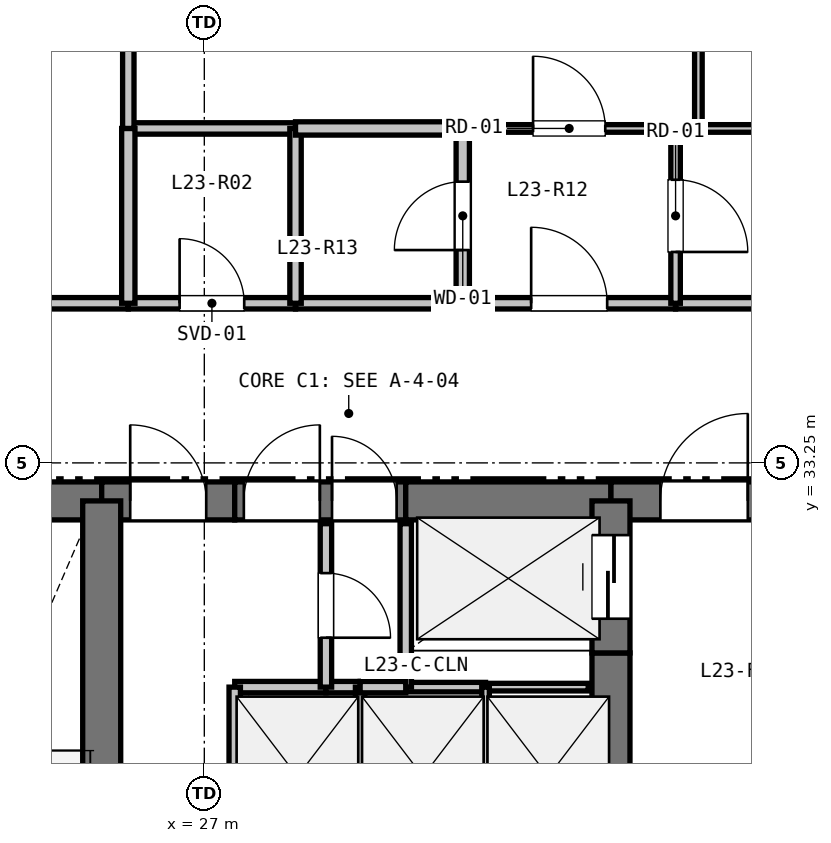
"""IFC4 building model, lengths in metres.
Left out: names, types, materials, properties, quantities, classifications, styles, units other than length and angle.
Written with IfcOpenShell. Run it as: python <this file> out.ifc"""

import sys

from ifc_helpers import new_model, si_unit, direction, frame, frame_2d, origin, place, context, subcontext, project, spatial, rectangle, extrude, element, fill, save


model = new_model("IFC4")
c1 = context("Model", 3, precision=1e-05, world=origin(), true_north=direction((0.0, 1.0)))
c2 = subcontext(c1, "Body", "Model", "MODEL_VIEW")
j1 = project(units=[si_unit("LENGTHUNIT", "METRE"), si_unit("PLANEANGLEUNIT", "RADIAN")], contexts=[c1])
p1 = place(None, origin())
s1 = spatial("IfcSite", under=j1, at=p1, CompositionType="ELEMENT")
p2 = place(p1, origin())
s2 = spatial("IfcBuilding", under=s1, at=p2, CompositionType="ELEMENT")
p3 = place(p2, frame((0.0, 0.0, 86.7)))
s3 = spatial("IfcBuildingStorey", under=s2, at=p3, CompositionType="ELEMENT", Elevation=86.7)
p4 = place(p3, frame((17.12, 36.097, 0.0), z_axis=(0.0, 0.0, 1.0), x_axis=(0.866027010039, 0.499997217876, 0.0)))
e1 = element("IfcWall", 1, at=p4, inside=s3, PredefinedType="PARAPET", context=c2, shape_type="SweptSolid", body=[
    extrude(rectangle(XDim=11.229, YDim=0.2, at=frame_2d((5.615, 0.0))), origin(), (0.0, 0.0, 1.0), 0.2),
])
p5 = place(p3, frame((22.2, 32.75, 0.0), z_axis=(0.0, 0.0, 1.0), x_axis=(1.0, 0.0, 0.0)))
e2 = element("IfcWall", 2, at=p5, inside=s3, PredefinedType="SHEAR", context=c2, shape_type="SweptSolid", body=[
    extrude(rectangle(XDim=3.45, YDim=0.5, at=frame_2d((1.725, 0.0))), origin(), (0.0, 0.0, 1.0), 3.05),
])
p6 = place(p3, frame((25.65, 32.75, 0.0), z_axis=(0.0, 0.0, 1.0), x_axis=(1.0, 0.0, 0.0)))
e3 = element("IfcWall", 3, at=p6, inside=s3, PredefinedType="SHEAR", context=c2, shape_type="SweptSolid", body=[
    extrude(rectangle(XDim=1.75, YDim=0.5, at=frame_2d((0.875, 0.0))), origin(), (0.0, 0.0, 1.0), 3.05),
])
p7 = place(p6, frame((0.375, 0.0, 0.0)))
e4 = element("IfcOpeningElement", 4, at=p7, cuts=e3, PredefinedType="OPENING", context=c2, shape_type="SweptSolid", body=[
    extrude(rectangle(XDim=1.0, YDim=2.15, at=frame_2d((0.5, 1.075))), frame((0.0, 0.26, 0.0), z_axis=(0.0, -1.0, 0.0), x_axis=(1.0, 0.0, 0.0)), (0.0, 0.0, 1.0), 0.52),
])
p8 = place(p3, frame((27.4, 32.75, 0.0), z_axis=(0.0, 0.0, 1.0), x_axis=(1.0, 0.0, 0.0)))
e5 = element("IfcWall", 5, at=p8, inside=s3, PredefinedType="SHEAR", context=c2, shape_type="SweptSolid", body=[
    extrude(rectangle(XDim=2.25, YDim=0.5, at=frame_2d((1.125, 0.0))), origin(), (0.0, 0.0, 1.0), 3.05),
])
p9 = place(p8, frame((0.12, 0.0, 0.0)))
e6 = element("IfcOpeningElement", 6, at=p9, cuts=e5, PredefinedType="OPENING", context=c2, shape_type="SweptSolid", body=[
    extrude(rectangle(XDim=1.0, YDim=2.15, at=frame_2d((0.5, 1.075))), frame((0.0, 0.26, 0.0), z_axis=(0.0, -1.0, 0.0), x_axis=(1.0, 0.0, 0.0)), (0.0, 0.0, 1.0), 0.52),
])
p10 = place(p8, frame((1.28, 0.0, 0.0)))
e7 = element("IfcOpeningElement", 7, at=p10, cuts=e5, PredefinedType="OPENING", context=c2, shape_type="SweptSolid", body=[
    extrude(rectangle(XDim=0.85, YDim=2.1, at=frame_2d((0.425, 1.05))), frame((0.0, 0.26, 0.0), z_axis=(0.0, -1.0, 0.0), x_axis=(1.0, 0.0, 0.0)), (0.0, 0.0, 1.0), 0.52),
])
p11 = place(p3, frame((29.65, 32.75, 0.0), z_axis=(0.0, 0.0, 1.0), x_axis=(1.0, 0.0, 0.0)))
e8 = element("IfcWall", 8, at=p11, inside=s3, PredefinedType="SHEAR", context=c2, shape_type="SweptSolid", body=[
    extrude(rectangle(XDim=2.7, YDim=0.5, at=frame_2d((1.35, 0.0))), origin(), (0.0, 0.0, 1.0), 3.05),
])
p12 = place(p3, frame((32.35, 32.75, 0.0), z_axis=(0.0, 0.0, 1.0), x_axis=(1.0, 0.0, 0.0)))
e9 = element("IfcWall", 9, at=p12, inside=s3, PredefinedType="SHEAR", context=c2, shape_type="SweptSolid", body=[
    extrude(rectangle(XDim=3.45, YDim=0.5, at=frame_2d((1.725, 0.0))), origin(), (0.0, 0.0, 1.0), 3.05),
])
p13 = place(p12, frame((0.65, 0.0, 0.0)))
e10 = element("IfcOpeningElement", 10, at=p13, cuts=e9, PredefinedType="OPENING", context=c2, shape_type="SweptSolid", body=[
    extrude(rectangle(XDim=1.15, YDim=2.15, at=frame_2d((0.575, 1.075))), frame((0.0, 0.26, 0.0), z_axis=(0.0, -1.0, 0.0), x_axis=(1.0, 0.0, 0.0)), (0.0, 0.0, 1.0), 0.52),
])
p14 = place(p3, frame((25.65, 27.95, 0.0), z_axis=(0.0, 0.0, 1.0), x_axis=(0.0, 1.0, 0.0)))
e11 = element("IfcWall", 11, at=p14, inside=s3, PredefinedType="SHEAR", context=c2, shape_type="SweptSolid", body=[
    extrude(rectangle(XDim=4.8, YDim=0.5, at=frame_2d((2.4, 0.0))), origin(), (0.0, 0.0, 1.0), 3.05),
])
p15 = place(p3, frame((32.35, 27.95, 0.0), z_axis=(0.0, 0.0, 1.0), x_axis=(0.0, 1.0, 0.0)))
e12 = element("IfcWall", 12, at=p15, inside=s3, PredefinedType="SHEAR", context=c2, shape_type="SweptSolid", body=[
    extrude(rectangle(XDim=2.8, YDim=0.5, at=frame_2d((1.4, 0.0))), origin(), (0.0, 0.0, 1.0), 3.05),
])
p16 = place(p3, frame((32.35, 30.75, 0.0), z_axis=(0.0, 0.0, 1.0), x_axis=(0.0, 1.0, 0.0)))
e13 = element("IfcWall", 13, at=p16, inside=s3, PredefinedType="SHEAR", context=c2, shape_type="SweptSolid", body=[
    extrude(rectangle(XDim=2.0, YDim=0.5, at=frame_2d((1.0, 0.0))), origin(), (0.0, 0.0, 1.0), 3.05),
])
p17 = place(p16, frame((0.45, 0.0, 0.0)))
e14 = element("IfcOpeningElement", 14, at=p17, cuts=e13, PredefinedType="OPENING", context=c2, shape_type="SweptSolid", body=[
    extrude(rectangle(XDim=1.1, YDim=2.15, at=frame_2d((0.55, 1.075))), frame((0.0, 0.26, 0.0), z_axis=(0.0, -1.0, 0.0), x_axis=(1.0, 0.0, 0.0)), (0.0, 0.0, 1.0), 0.52),
])
p18 = place(p3, frame((32.05, 30.3, 0.0), z_axis=(0.0, 0.0, 1.0), x_axis=(-1.0, 0.0, 0.0)))
e15 = element("IfcWall", 15, at=p18, inside=s3, PredefinedType="PARTITIONING", context=c2, shape_type="SweptSolid", body=[
    extrude(rectangle(XDim=1.35, YDim=0.1, at=frame_2d((0.675, 0.0))), origin(), (0.0, 0.0, 1.0), 3.05),
])
p19 = place(p3, frame((30.7, 30.3, 0.0), z_axis=(0.0, 0.0, 1.0), x_axis=(-1.0, 0.0, 0.0)))
e16 = element("IfcWall", 16, at=p19, inside=s3, PredefinedType="PARTITIONING", context=c2, shape_type="SweptSolid", body=[
    extrude(rectangle(XDim=1.05, YDim=0.125, at=frame_2d((0.525, 0.0))), origin(), (0.0, 0.0, 1.0), 3.05),
])
p20 = place(p3, frame((29.65, 30.3, 0.0), z_axis=(0.0, 0.0, 1.0), x_axis=(0.0, 1.0, 0.0)))
e17 = element("IfcWall", 17, at=p20, inside=s3, PredefinedType="PARTITIONING", context=c2, shape_type="SweptSolid", body=[
    extrude(rectangle(XDim=2.15, YDim=0.15, at=frame_2d((1.075, 0.0))), origin(), (0.0, 0.0, 1.0), 3.05),
])
p21 = place(p3, frame((27.4, 30.3, 0.0), z_axis=(0.0, 0.0, 1.0), x_axis=(1.0, 0.0, 0.0)))
e18 = element("IfcWall", 18, at=p21, inside=s3, PredefinedType="PARTITIONING", context=c2, shape_type="SweptSolid", body=[
    extrude(rectangle(XDim=1.2, YDim=0.15, at=frame_2d((0.6, 0.0))), origin(), (0.0, 0.0, 1.0), 3.05),
])
p22 = place(p3, frame((28.6, 30.3, 0.0), z_axis=(0.0, 0.0, 1.0), x_axis=(1.0, 0.0, 0.0)))
e19 = element("IfcWall", 19, at=p22, inside=s3, PredefinedType="PARTITIONING", context=c2, shape_type="SweptSolid", body=[
    extrude(rectangle(XDim=0.45, YDim=0.15, at=frame_2d((0.225, 0.0))), origin(), (0.0, 0.0, 1.0), 3.05),
])
p23 = place(p3, frame((29.05, 30.3, 0.0), z_axis=(0.0, 0.0, 1.0), x_axis=(0.0, -1.0, 0.0)))
e20 = element("IfcWall", 20, at=p23, inside=s3, PredefinedType="PARTITIONING", context=c2, shape_type="SweptSolid", body=[
    extrude(rectangle(XDim=2.2, YDim=0.125, at=frame_2d((1.1, 0.0))), origin(), (0.0, 0.0, 1.0), 3.05),
])
p24 = place(p3, frame((27.4, 28.1, 0.0), z_axis=(0.0, 0.0, 1.0), x_axis=(0.0, 1.0, 0.0)))
e21 = element("IfcWall", 21, at=p24, inside=s3, PredefinedType="PARTITIONING", context=c2, shape_type="SweptSolid", body=[
    extrude(rectangle(XDim=2.2, YDim=0.15, at=frame_2d((1.1, 0.0))), origin(), (0.0, 0.0, 1.0), 3.05),
])
p25 = place(p3, frame((29.05, 30.3, 0.0), z_axis=(0.0, 0.0, 1.0), x_axis=(1.0, 0.0, 0.0)))
e22 = element("IfcWall", 22, at=p25, inside=s3, PredefinedType="PARTITIONING", context=c2, shape_type="SweptSolid", body=[
    extrude(rectangle(XDim=0.6, YDim=0.15, at=frame_2d((0.3, 0.0))), origin(), (0.0, 0.0, 1.0), 3.05),
])
p26 = place(p3, frame((30.7, 30.3, 0.0), z_axis=(0.0, 0.0, 1.0), x_axis=(0.0, -1.0, 0.0)))
e23 = element("IfcWall", 23, at=p26, inside=s3, PredefinedType="PARTITIONING", context=c2, shape_type="SweptSolid", body=[
    extrude(rectangle(XDim=2.2, YDim=0.1, at=frame_2d((1.1, 0.0))), origin(), (0.0, 0.0, 1.0), 3.05),
])
p27 = place(p3, frame((28.6, 32.45, 0.0), z_axis=(0.0, 0.0, 1.0), x_axis=(0.0, -1.0, 0.0)))
e24 = element("IfcWall", 24, at=p27, inside=s3, PredefinedType="PARTITIONING", context=c2, shape_type="SweptSolid", body=[
    extrude(rectangle(XDim=2.15, YDim=0.15, at=frame_2d((1.075, 0.0))), origin(), (0.0, 0.0, 1.0), 3.05),
])
p28 = place(p27, frame((0.65, 0.0, 0.0)))
e25 = element("IfcOpeningElement", 25, at=p28, cuts=e24, PredefinedType="OPENING", context=c2, shape_type="SweptSolid", body=[
    extrude(rectangle(XDim=0.85, YDim=2.1, at=frame_2d((0.425, 1.05))), frame((0.0, 0.085, 0.0), z_axis=(0.0, -1.0, 0.0), x_axis=(1.0, 0.0, 0.0)), (0.0, 0.0, 1.0), 0.17),
])
p29 = place(p3, frame((19.6, 35.35, 0.0), z_axis=(0.0, 0.0, 1.0), x_axis=(1.0, 0.0, 0.0)))
e26 = element("IfcWall", 26, at=p29, inside=s3, PredefinedType="PARTITIONING", context=c2, shape_type="SweptSolid", body=[
    extrude(rectangle(XDim=6.4, YDim=0.15, at=frame_2d((3.2, 0.0))), origin(), (0.0, 0.0, 1.0), 3.05),
])
p30 = place(p29, frame((2.966, 0.0, 0.0)))
e27 = element("IfcOpeningElement", 27, at=p30, cuts=e26, PredefinedType="OPENING", context=c2, shape_type="SweptSolid", body=[
    extrude(rectangle(XDim=1.8, YDim=2.2, at=frame_2d((0.9, 1.1))), frame((0.0, 0.085, 0.0), z_axis=(0.0, -1.0, 0.0), x_axis=(1.0, 0.0, 0.0)), (0.0, 0.0, 1.0), 0.17),
])
p31 = place(p3, frame((26.0, 35.35, 0.0), z_axis=(0.0, 0.0, 1.0), x_axis=(1.0, 0.0, 0.0)))
e28 = element("IfcWall", 28, at=p31, inside=s3, PredefinedType="PARTITIONING", context=c2, shape_type="SweptSolid", body=[
    extrude(rectangle(XDim=2.2, YDim=0.15, at=frame_2d((1.1, 0.0))), origin(), (0.0, 0.0, 1.0), 3.05),
])
p32 = place(p31, frame((0.675, 0.0, 0.0)))
e29 = element("IfcOpeningElement", 29, at=p32, cuts=e28, PredefinedType="OPENING", context=c2, shape_type="SweptSolid", body=[
    extrude(rectangle(XDim=0.85, YDim=2.1, at=frame_2d((0.425, 1.05))), frame((0.0, 0.085, 0.0), z_axis=(0.0, -1.0, 0.0), x_axis=(1.0, 0.0, 0.0)), (0.0, 0.0, 1.0), 0.17),
])
p33 = place(p3, frame((28.2, 35.35, 0.0), z_axis=(0.0, 0.0, 1.0), x_axis=(1.0, 0.0, 0.0)))
e30 = element("IfcWall", 30, at=p33, inside=s3, PredefinedType="PARTITIONING", context=c2, shape_type="SweptSolid", body=[
    extrude(rectangle(XDim=2.2, YDim=0.15, at=frame_2d((1.1, 0.0))), origin(), (0.0, 0.0, 1.0), 3.05),
])
p34 = place(p3, frame((30.4, 35.35, 0.0), z_axis=(0.0, 0.0, 1.0), x_axis=(1.0, 0.0, 0.0)))
e31 = element("IfcWall", 31, at=p34, inside=s3, PredefinedType="PARTITIONING", context=c2, shape_type="SweptSolid", body=[
    extrude(rectangle(XDim=2.8, YDim=0.15, at=frame_2d((1.4, 0.0))), origin(), (0.0, 0.0, 1.0), 3.05),
])
p35 = place(p34, frame((0.9, 0.0, 0.0)))
e32 = element("IfcOpeningElement", 32, at=p35, cuts=e31, PredefinedType="OPENING", context=c2, shape_type="SweptSolid", body=[
    extrude(rectangle(XDim=1.0, YDim=2.15, at=frame_2d((0.5, 1.075))), frame((0.0, 0.085, 0.0), z_axis=(0.0, -1.0, 0.0), x_axis=(1.0, 0.0, 0.0)), (0.0, 0.0, 1.0), 0.17),
])
p36 = place(p3, frame((33.2, 35.35, 0.0), z_axis=(0.0, 0.0, 1.0), x_axis=(1.0, 0.0, 0.0)))
e33 = element("IfcWall", 33, at=p36, inside=s3, PredefinedType="PARTITIONING", context=c2, shape_type="SweptSolid", body=[
    extrude(rectangle(XDim=2.6, YDim=0.15, at=frame_2d((1.3, 0.0))), origin(), (0.0, 0.0, 1.0), 3.05),
])
p37 = place(p3, frame((30.4, 37.65, 0.0), z_axis=(0.0, 0.0, 1.0), x_axis=(1.0, 0.0, 0.0)))
e34 = element("IfcWall", 34, at=p37, inside=s3, PredefinedType="PARTITIONING", context=c2, shape_type="SweptSolid", body=[
    extrude(rectangle(XDim=2.8, YDim=0.1, at=frame_2d((1.4, 0.0))), origin(), (0.0, 0.0, 1.0), 3.05),
])
p38 = place(p37, frame((0.925, 0.0, 0.0)))
e35 = element("IfcOpeningElement", 35, at=p38, cuts=e34, PredefinedType="OPENING", context=c2, shape_type="SweptSolid", body=[
    extrude(rectangle(XDim=0.95, YDim=2.1, at=frame_2d((0.475, 1.05))), frame((0.0, 0.06, 0.0), z_axis=(0.0, -1.0, 0.0), x_axis=(1.0, 0.0, 0.0)), (0.0, 0.0, 1.0), 0.12),
])
p39 = place(p3, frame((33.2, 37.65, 0.0), z_axis=(0.0, 0.0, 1.0), x_axis=(0.0, -1.0, 0.0)))
e36 = element("IfcWall", 36, at=p39, inside=s3, PredefinedType="PARTITIONING", context=c2, shape_type="SweptSolid", body=[
    extrude(rectangle(XDim=2.3, YDim=0.125, at=frame_2d((1.15, 0.0))), origin(), (0.0, 0.0, 1.0), 3.05),
])
p40 = place(p39, frame((0.675, 0.0, 0.0)))
e37 = element("IfcOpeningElement", 37, at=p40, cuts=e36, PredefinedType="OPENING", context=c2, shape_type="SweptSolid", body=[
    extrude(rectangle(XDim=0.95, YDim=2.1, at=frame_2d((0.475, 1.05))), frame((0.0, 0.073, 0.0), z_axis=(0.0, -1.0, 0.0), x_axis=(1.0, 0.0, 0.0)), (0.0, 0.0, 1.0), 0.145),
])
p41 = place(p3, frame((30.4, 35.35, 0.0), z_axis=(0.0, 0.0, 1.0), x_axis=(0.0, 1.0, 0.0)))
e38 = element("IfcWall", 38, at=p41, inside=s3, PredefinedType="PLUMBINGWALL", context=c2, shape_type="SweptSolid", body=[
    extrude(rectangle(XDim=2.3, YDim=0.175, at=frame_2d((1.15, 0.0))), origin(), (0.0, 0.0, 1.0), 3.05),
])
p42 = place(p41, frame((0.7, 0.0, 0.0)))
e39 = element("IfcOpeningElement", 39, at=p42, cuts=e38, PredefinedType="OPENING", context=c2, shape_type="SweptSolid", body=[
    extrude(rectangle(XDim=0.9, YDim=2.1, at=frame_2d((0.45, 1.05))), frame((0.0, 0.097, 0.0), z_axis=(0.0, -1.0, 0.0), x_axis=(1.0, 0.0, 0.0)), (0.0, 0.0, 1.0), 0.195),
])
p43 = place(p3, frame((26.0, 37.65, 0.0), z_axis=(0.0, 0.0, 1.0), x_axis=(1.0, 0.0, 0.0)))
e40 = element("IfcWall", 40, at=p43, inside=s3, PredefinedType="PARTITIONING", context=c2, shape_type="SweptSolid", body=[
    extrude(rectangle(XDim=2.2, YDim=0.15, at=frame_2d((1.1, 0.0))), origin(), (0.0, 0.0, 1.0), 3.05),
])
p44 = place(p3, frame((28.2, 37.65, 0.0), z_axis=(0.0, 0.0, 1.0), x_axis=(0.0, -1.0, 0.0)))
e41 = element("IfcWall", 41, at=p44, inside=s3, PredefinedType="PARTITIONING", context=c2, shape_type="SweptSolid", body=[
    extrude(rectangle(XDim=2.3, YDim=0.15, at=frame_2d((1.15, 0.0))), origin(), (0.0, 0.0, 1.0), 3.05),
])
p45 = place(p3, frame((26.0, 35.35, 0.0), z_axis=(0.0, 0.0, 1.0), x_axis=(0.0, 1.0, 0.0)))
e42 = element("IfcWall", 42, at=p45, inside=s3, PredefinedType="PLUMBINGWALL", context=c2, shape_type="SweptSolid", body=[
    extrude(rectangle(XDim=2.3, YDim=0.175, at=frame_2d((1.15, 0.0))), origin(), (0.0, 0.0, 1.0), 3.05),
])
p46 = place(p3, frame((28.2, 37.65, 0.0), z_axis=(0.0, 0.0, 1.0), x_axis=(1.0, 0.0, 0.0)))
e43 = element("IfcWall", 43, at=p46, inside=s3, PredefinedType="PLUMBINGWALL", context=c2, shape_type="SweptSolid", body=[
    extrude(rectangle(XDim=2.2, YDim=0.175, at=frame_2d((1.1, 0.0))), origin(), (0.0, 0.0, 1.0), 3.05),
])
p47 = place(p3, frame((33.2, 37.65, 0.0), z_axis=(0.0, 0.0, 1.0), x_axis=(1.0, 0.0, 0.0)))
e44 = element("IfcWall", 44, at=p47, inside=s3, PredefinedType="PARTITIONING", context=c2, shape_type="SweptSolid", body=[
    extrude(rectangle(XDim=0.3, YDim=0.125, at=frame_2d((0.15, 0.0))), origin(), (0.0, 0.0, 1.0), 3.05),
])
p48 = place(p3, frame((33.5, 37.65, 0.0), z_axis=(0.0, 0.0, 1.0), x_axis=(1.0, 0.0, 0.0)))
e45 = element("IfcWall", 45, at=p48, inside=s3, PredefinedType="PARTITIONING", context=c2, shape_type="SweptSolid", body=[
    extrude(rectangle(XDim=4.77, YDim=0.1, at=frame_2d((2.385, 0.0))), origin(), (0.0, 0.0, 1.0), 2.423),
])
p49 = place(p3, frame((26.0, 41.182, 0.0), z_axis=(0.0, 0.0, 1.0), x_axis=(0.0, -1.0, 0.0)))
e46 = element("IfcWall", 46, at=p49, inside=s3, PredefinedType="PARTITIONING", context=c2, shape_type="SweptSolid", body=[
    extrude(rectangle(XDim=3.532, YDim=0.15, at=frame_2d((1.766, 0.0))), origin(), (0.0, 0.0, 1.0), 2.365),
])
p50 = place(p3, frame((33.5, 43.13, 0.0), z_axis=(0.0, 0.0, 1.0), x_axis=(0.0, -1.0, 0.0)))
e47 = element("IfcWall", 47, at=p50, inside=s3, PredefinedType="PARTITIONING", context=c2, shape_type="SweptSolid", body=[
    extrude(rectangle(XDim=5.48, YDim=0.1, at=frame_2d((2.74, 0.0))), origin(), (0.0, 0.0, 1.0), 3.05),
])
p51 = place(p50, frame((2.265, 0.0, 0.0)))
e48 = element("IfcOpeningElement", 48, at=p51, cuts=e47, PredefinedType="OPENING", context=c2, shape_type="SweptSolid", body=[
    extrude(rectangle(XDim=0.95, YDim=2.1, at=frame_2d((0.475, 1.05))), frame((0.0, 0.06, 0.0), z_axis=(0.0, -1.0, 0.0), x_axis=(1.0, 0.0, 0.0)), (0.0, 0.0, 1.0), 0.12),
])
p52 = place(p7, origin())
e49 = element("IfcDoor", 49, at=p52, inside=s3, OperationType="SINGLE_SWING_LEFT", PredefinedType="DOOR", context=c2, shape_type="SweptSolid", body=[
    extrude(rectangle(XDim=1.0, YDim=2.15, at=frame_2d((0.5, 1.075))), frame((0.0, 0.025, 0.0), z_axis=(0.0, -1.0, 0.0), x_axis=(1.0, 0.0, 0.0)), (0.0, 0.0, 1.0), 0.05),
])
fill(e4, e49)
p53 = place(p17, origin())
e50 = element("IfcDoor", 50, at=p53, inside=s3, OperationType="SLIDING_TO_LEFT", PredefinedType="DOOR", context=c2, shape_type="SweptSolid", body=[
    extrude(rectangle(XDim=1.1, YDim=2.15, at=frame_2d((0.55, 1.075))), frame((0.0, 0.025, 0.0), z_axis=(0.0, -1.0, 0.0), x_axis=(1.0, 0.0, 0.0)), (0.0, 0.0, 1.0), 0.05),
])
fill(e14, e50)
p54 = place(p13, origin())
e51 = element("IfcDoor", 51, at=p54, inside=s3, OperationType="SINGLE_SWING_RIGHT", PredefinedType="DOOR", context=c2, shape_type="SweptSolid", body=[
    extrude(rectangle(XDim=1.15, YDim=2.15, at=frame_2d((0.575, 1.075))), frame((0.0, 0.025, 0.0), z_axis=(0.0, -1.0, 0.0), x_axis=(1.0, 0.0, 0.0)), (0.0, 0.0, 1.0), 0.05),
])
fill(e10, e51)
p55 = place(p9, origin())
e52 = element("IfcDoor", 52, at=p55, inside=s3, OperationType="SINGLE_SWING_RIGHT", PredefinedType="DOOR", context=c2, shape_type="SweptSolid", body=[
    extrude(rectangle(XDim=1.0, YDim=2.15, at=frame_2d((0.5, 1.075))), frame((0.0, 0.025, 0.0), z_axis=(0.0, -1.0, 0.0), x_axis=(1.0, 0.0, 0.0)), (0.0, 0.0, 1.0), 0.05),
])
fill(e6, e52)
p56 = place(p28, origin())
e53 = element("IfcDoor", 53, at=p56, inside=s3, OperationType="SINGLE_SWING_RIGHT", PredefinedType="DOOR", context=c2, shape_type="SweptSolid", body=[
    extrude(rectangle(XDim=0.85, YDim=2.1, at=frame_2d((0.425, 1.05))), frame((0.0, 0.025, 0.0), z_axis=(0.0, -1.0, 0.0), x_axis=(1.0, 0.0, 0.0)), (0.0, 0.0, 1.0), 0.05),
])
fill(e25, e53)
p57 = place(p35, origin())
e54 = element("IfcDoor", 54, at=p57, inside=s3, OperationType="SINGLE_SWING_LEFT", PredefinedType="DOOR", context=c2, shape_type="SweptSolid", body=[
    extrude(rectangle(XDim=1.0, YDim=2.15, at=frame_2d((0.5, 1.075))), frame((0.0, 0.025, 0.0), z_axis=(0.0, -1.0, 0.0), x_axis=(1.0, 0.0, 0.0)), (0.0, 0.0, 1.0), 0.05),
])
fill(e32, e54)
p58 = place(p32, origin())
e55 = element("IfcDoor", 55, at=p58, inside=s3, OperationType="SINGLE_SWING_LEFT", PredefinedType="DOOR", context=c2, shape_type="SweptSolid", body=[
    extrude(rectangle(XDim=0.85, YDim=2.1, at=frame_2d((0.425, 1.05))), frame((0.0, 0.025, 0.0), z_axis=(0.0, -1.0, 0.0), x_axis=(1.0, 0.0, 0.0)), (0.0, 0.0, 1.0), 0.05),
])
fill(e29, e55)
p59 = place(p10, origin())
e56 = element("IfcDoor", 56, at=p59, inside=s3, OperationType="SINGLE_SWING_LEFT", PredefinedType="DOOR", context=c2, shape_type="SweptSolid", body=[
    extrude(rectangle(XDim=0.85, YDim=2.1, at=frame_2d((0.425, 1.05))), frame((0.0, 0.025, 0.0), z_axis=(0.0, -1.0, 0.0), x_axis=(1.0, 0.0, 0.0)), (0.0, 0.0, 1.0), 0.05),
])
fill(e7, e56)
p60 = place(p42, origin())
e57 = element("IfcDoor", 57, at=p60, inside=s3, OperationType="SINGLE_SWING_LEFT", PredefinedType="DOOR", context=c2, shape_type="SweptSolid", body=[
    extrude(rectangle(XDim=0.9, YDim=2.1, at=frame_2d((0.45, 1.05))), frame((0.0, 0.025, 0.0), z_axis=(0.0, -1.0, 0.0), x_axis=(1.0, 0.0, 0.0)), (0.0, 0.0, 1.0), 0.05),
])
fill(e39, e57)
p61 = place(p40, origin())
e58 = element("IfcDoor", 58, at=p61, inside=s3, OperationType="SINGLE_SWING_RIGHT", PredefinedType="DOOR", context=c2, shape_type="SweptSolid", body=[
    extrude(rectangle(XDim=0.95, YDim=2.1, at=frame_2d((0.475, 1.05))), frame((0.0, 0.025, 0.0), z_axis=(0.0, -1.0, 0.0), x_axis=(1.0, 0.0, 0.0)), (0.0, 0.0, 1.0), 0.05),
])
fill(e37, e58)
p62 = place(p38, origin())
e59 = element("IfcDoor", 59, at=p62, inside=s3, OperationType="SINGLE_SWING_LEFT", PredefinedType="DOOR", context=c2, shape_type="SweptSolid", body=[
    extrude(rectangle(XDim=0.95, YDim=2.1, at=frame_2d((0.475, 1.05))), frame((0.0, 0.025, 0.0), z_axis=(0.0, -1.0, 0.0), x_axis=(1.0, 0.0, 0.0)), (0.0, 0.0, 1.0), 0.05),
])
fill(e35, e59)
save(model, sys.argv[1])
